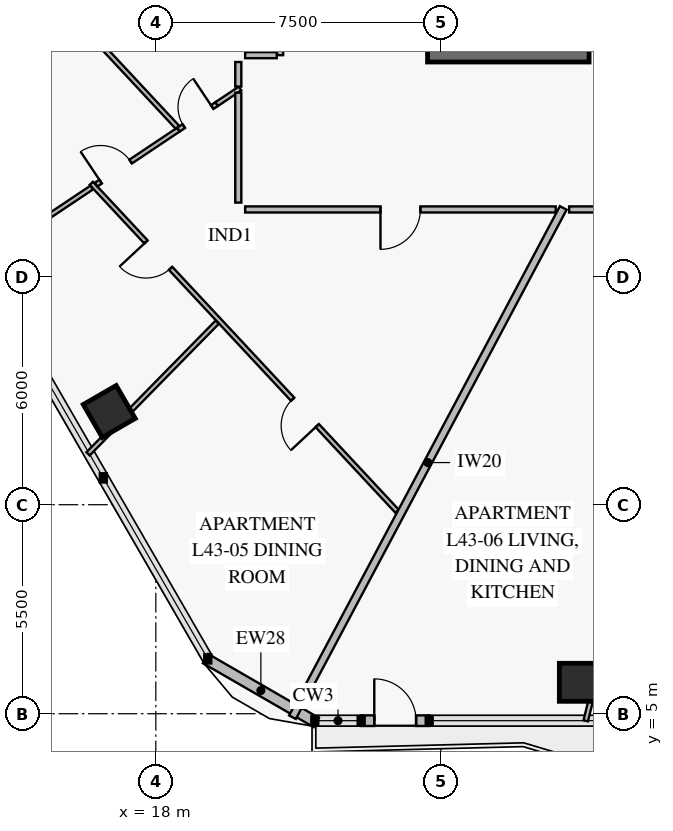
"""IFC4 building model, lengths in metres.
Left out: names, types, materials, properties, quantities, classifications, styles, units other than length and angle.
Written with IfcOpenShell. Run it as: python <this file> out.ifc"""

import sys

from ifc_helpers import new_model, si_unit, direction, frame, frame_2d, origin, origin_2d, place, context, subcontext, project, spatial, rectangle, extrude, element, fill, save


model = new_model("IFC4")
c1 = context("Model", 3, precision=1e-05, world=origin(), true_north=direction((0.0, 1.0)))
c2 = subcontext(c1, "Body", "Model", "MODEL_VIEW")
j1 = project(units=[si_unit("LENGTHUNIT", "METRE"), si_unit("PLANEANGLEUNIT", "RADIAN")], contexts=[c1])
p1 = place(None, origin())
s1 = spatial("IfcSite", under=j1, at=p1, CompositionType="ELEMENT")
p2 = place(p1, origin())
s2 = spatial("IfcBuilding", under=s1, at=p2, CompositionType="ELEMENT")
p3 = place(p2, frame((0.0, 0.0, 173.2)))
s3 = spatial("IfcBuildingStorey", under=s2, at=p3, CompositionType="ELEMENT", Elevation=173.2)
p4 = place(p3, frame((25.15, 22.5, 0.0), z_axis=(0.0, 0.0, 1.0), x_axis=(1.0, 0.0, 0.0)))
e1 = element("IfcWall", 1, at=p4, inside=s3, PredefinedType="SHEAR", context=c2, shape_type="SweptSolid", body=[
    extrude(rectangle(XDim=9.9, YDim=0.7, at=frame_2d((4.95, 0.0))), origin(), (0.0, 0.0, 1.0), 3.8),
])
p5 = place(p4, frame((4.25, 0.0, 0.0)))
e2 = element("IfcOpeningElement", 2, at=p5, cuts=e1, PredefinedType="OPENING", context=c2, shape_type="SweptSolid", body=[
    extrude(rectangle(XDim=1.5, YDim=2.15, at=frame_2d((0.75, 1.075))), frame((0.0, 0.362, 0.0), z_axis=(0.0, -1.0, 0.0), x_axis=(1.0, 0.0, 0.0)), (0.0, 0.0, 1.0), 0.724),
])
for number, where, z_axis, x_axis in (
    (3, (16.774, 12.953, 0.0), (0.0, 0.0, 1.0), (0.5, -0.866, 0.0)),
    (4, (29.118, 5.827, 0.0), (0.0, 0.0, 1.0), (1.0, 0.0, 0.0)),
):
    element("IfcColumn", number, at=place(p3, frame(where, z_axis=z_axis, x_axis=x_axis)), inside=s3, PredefinedType="COLUMN", context=c2, shape_type="SweptSolid", body=[
        extrude(rectangle(XDim=1.0, YDim=1.0, at=origin_2d()), origin(), (0.0, 0.0, 1.0), 3.55),
    ])
p6 = place(p3, frame((25.193, 4.817, 0.0), z_axis=(0.0, 0.0, 1.0), x_axis=(-1.0, 0.0, 0.0)))
e5 = element("IfcWall", 5, at=p6, inside=s3, PredefinedType="SOLIDWALL", context=c2, shape_type="SweptSolid", body=[
    extrude(rectangle(XDim=1.79, YDim=0.28, at=frame_2d((0.895, 0.0))), origin(), (0.0, 0.0, 1.0), 3.55),
])
p7 = place(p6, frame((0.345, 0.0, 0.0)))
e6 = element("IfcOpeningElement", 6, at=p7, cuts=e5, PredefinedType="OPENING", context=c2, shape_type="SweptSolid", body=[
    extrude(rectangle(XDim=1.1, YDim=2.2, at=frame_2d((0.55, 1.1))), frame((0.0, 0.152, 0.0), z_axis=(0.0, -1.0, 0.0), x_axis=(1.0, 0.0, 0.0)), (0.0, 0.0, 1.0), 0.304),
])
p8 = place(p3, frame((22.221, 4.769, 0.0), z_axis=(0.0, 0.0, 1.0), x_axis=(-0.866020068361, 0.500009241111, 0.0)))
e7 = element("IfcWall", 7, at=p8, inside=s3, PredefinedType="SOLIDWALL", context=c2, shape_type="SweptSolid", body=[
    extrude(rectangle(XDim=3.365, YDim=0.28, at=frame_2d((1.683, 0.0))), origin(), (0.0, 0.0, 1.0), 3.55),
])
p9 = place(p3, frame((16.302, 18.958, 0.0), z_axis=(0.0, 0.0, 1.0), x_axis=(0.681998933698, -0.731353166695, 0.0)))
e8 = element("IfcWall", 8, at=p9, inside=s3, PredefinedType="PARTITIONING", context=c2, shape_type="SweptSolid", body=[
    extrude(rectangle(XDim=11.798, YDim=0.12, at=frame_2d((5.899, 0.0))), origin(), (0.0, 0.0, 1.0), 2.9),
])
p10 = place(p9, frame((2.11, 0.0, 0.0)))
e9 = element("IfcOpeningElement", 9, at=p10, cuts=e8, PredefinedType="OPENING", context=c2, shape_type="SweptSolid", body=[
    extrude(rectangle(XDim=0.95, YDim=2.1, at=frame_2d((0.475, 1.05))), frame((0.0, 0.072, 0.0), z_axis=(0.0, -1.0, 0.0), x_axis=(1.0, 0.0, 0.0)), (0.0, 0.0, 1.0), 0.144),
])
p11 = place(p9, frame((7.769, 0.0, 0.0)))
e10 = element("IfcOpeningElement", 10, at=p11, cuts=e8, PredefinedType="OPENING", context=c2, shape_type="SweptSolid", body=[
    extrude(rectangle(XDim=0.95, YDim=2.1, at=frame_2d((0.475, 1.05))), frame((0.0, 0.072, 0.0), z_axis=(0.0, -1.0, 0.0), x_axis=(1.0, 0.0, 0.0)), (0.0, 0.0, 1.0), 0.144),
])
p12 = place(p3, frame((19.6, 21.042, 0.0), z_axis=(0.0, 0.0, 1.0), x_axis=(-0.831460345356, -0.555584101735, 0.0)))
e11 = element("IfcWall", 11, at=p12, inside=s3, PredefinedType="PARTITIONING", context=c2, shape_type="SweptSolid", body=[
    extrude(rectangle(XDim=1.211, YDim=0.12, at=frame_2d((0.605, 0.0))), origin(), (0.0, 0.0, 1.0), 3.15),
])
p13 = place(p12, frame((0.14, 0.0, 0.0)))
e12 = element("IfcOpeningElement", 12, at=p13, cuts=e11, PredefinedType="OPENING", context=c2, shape_type="SweptSolid", body=[
    extrude(rectangle(XDim=0.9, YDim=2.1, at=frame_2d((0.45, 1.05))), frame((0.0, 0.072, 0.0), z_axis=(0.0, -1.0, 0.0), x_axis=(1.0, 0.0, 0.0)), (0.0, 0.0, 1.0), 0.144),
])
p14 = place(p3, frame((18.594, 20.369, 0.0), z_axis=(0.0, 0.0, 1.0), x_axis=(-0.831487480853, -0.555543489913, 0.0)))
e13 = element("IfcWall", 13, at=p14, inside=s3, PredefinedType="PARTITIONING", context=c2, shape_type="SweptSolid", body=[
    extrude(rectangle(XDim=2.605, YDim=0.12, at=frame_2d((1.302, 0.0))), origin(), (0.0, 0.0, 1.0), 3.55),
])
p15 = place(p14, frame((1.51, 0.0, 0.0)))
e14 = element("IfcOpeningElement", 14, at=p15, cuts=e13, PredefinedType="OPENING", context=c2, shape_type="SweptSolid", body=[
    extrude(rectangle(XDim=0.95, YDim=2.1, at=frame_2d((0.475, 1.05))), frame((0.0, 0.072, 0.0), z_axis=(0.0, -1.0, 0.0), x_axis=(1.0, 0.0, 0.0)), (0.0, 0.0, 1.0), 0.144),
])
p16 = place(p3, frame((16.313, 18.846, 0.0), z_axis=(0.0, 0.0, 1.0), x_axis=(-0.831481603923, -0.555552285872, 0.0)))
e15 = element("IfcWall", 15, at=p16, inside=s3, PredefinedType="PARTITIONING", context=c2, shape_type="SweptSolid", body=[
    extrude(rectangle(XDim=3.569, YDim=0.12, at=frame_2d((1.785, 0.0))), origin(), (0.0, 0.0, 1.0), 2.87),
])
p17 = place(p3, frame((20.35, 18.27, 0.0), z_axis=(0.0, 0.0, 1.0), x_axis=(1.0, 0.0, 0.0)))
e16 = element("IfcWall", 16, at=p17, inside=s3, PredefinedType="PARTITIONING", context=c2, shape_type="SweptSolid", body=[
    extrude(rectangle(XDim=8.172, YDim=0.16, at=frame_2d((4.086, 0.0))), origin(), (0.0, 0.0, 1.0), 2.9),
])
p18 = place(p17, frame((3.561, 0.0, 0.0)))
e17 = element("IfcOpeningElement", 17, at=p18, cuts=e16, PredefinedType="OPENING", context=c2, shape_type="SweptSolid", body=[
    extrude(rectangle(XDim=1.05, YDim=2.15, at=frame_2d((0.525, 1.075))), frame((0.0, 0.092, 0.0), z_axis=(0.0, -1.0, 0.0), x_axis=(1.0, 0.0, 0.0)), (0.0, 0.0, 1.0), 0.184),
])
p19 = place(p3, frame((28.875, 18.27, 0.0), z_axis=(0.0, 0.0, 1.0), x_axis=(1.0, 0.0, 0.0)))
e18 = element("IfcWall", 18, at=p19, inside=s3, PredefinedType="PARTITIONING", context=c2, shape_type="SweptSolid", body=[
    extrude(rectangle(XDim=3.727, YDim=0.16, at=frame_2d((1.863, 0.0))), origin(), (0.0, 0.0, 1.0), 2.9),
])
p20 = place(p19, frame((1.338, 0.0, 0.0)))
e19 = element("IfcOpeningElement", 19, at=p20, cuts=e18, PredefinedType="OPENING", context=c2, shape_type="SweptSolid", body=[
    extrude(rectangle(XDim=1.05, YDim=2.15, at=frame_2d((0.525, 1.075))), frame((0.0, 0.092, 0.0), z_axis=(0.0, -1.0, 0.0), x_axis=(1.0, 0.0, 0.0)), (0.0, 0.0, 1.0), 0.184),
])
p21 = place(p3, frame((21.31, 25.46, 0.0), z_axis=(0.0, 0.0, 1.0), x_axis=(-0.913543837416, -0.406740282146, 0.0)))
e20 = element("IfcWall", 20, at=p21, inside=s3, PredefinedType="PARTITIONING", context=c2, shape_type="SweptSolid", body=[
    extrude(rectangle(XDim=11.253, YDim=0.2, at=frame_2d((5.626, 0.0))), origin(), (0.0, 0.0, 1.0), 2.87),
])
p22 = place(p3, frame((19.616, 15.304, 0.0), z_axis=(0.0, 0.0, 1.0), x_axis=(-0.700410055049, -0.713740677548, 0.0)))
e21 = element("IfcWall", 21, at=p22, inside=s3, PredefinedType="PARTITIONING", context=c2, shape_type="SweptSolid", body=[
    extrude(rectangle(XDim=3.315, YDim=0.12, at=frame_2d((1.657, 0.0))), origin(), (0.0, 0.0, 1.0), 3.55),
])
p23 = place(p3, frame((16.8, 12.433, 0.0), z_axis=(0.0, 0.0, 1.0), x_axis=(-0.700476016825, -0.713675941765, 0.0)))
e22 = element("IfcWall", 22, at=p23, inside=s3, PredefinedType="PARTITIONING", context=c2, shape_type="SweptSolid", body=[
    extrude(rectangle(XDim=0.832, YDim=0.12, at=frame_2d((0.416, 0.0))), origin(), (0.0, 0.0, 1.0), 3.122),
])
p24 = place(p3, frame((20.215, 21.453, 0.0), z_axis=(0.0, 0.0, 1.0), x_axis=(-0.831491262241, -0.555537830231, 0.0)))
e23 = element("IfcWall", 23, at=p24, inside=s3, PredefinedType="PARTITIONING", context=c2, shape_type="SweptSolid", body=[
    extrude(rectangle(XDim=0.74, YDim=0.12, at=frame_2d((0.37, 0.0))), origin(), (0.0, 0.0, 1.0), 3.55),
])
p25 = place(p3, frame((16.138, 23.039, 0.0), z_axis=(0.0, 0.0, 1.0), x_axis=(0.682000707563, -0.731351512532, 0.0)))
e24 = element("IfcWall", 24, at=p25, inside=s3, PredefinedType="PARTITIONING", context=c2, shape_type="SweptSolid", body=[
    extrude(rectangle(XDim=3.562, YDim=0.12, at=frame_2d((1.781, 0.0))), origin(), (0.0, 0.0, 1.0), 3.55),
])
p26 = place(p3, frame((28.721, 18.31, 0.0), z_axis=(0.0, 0.0, 1.0), x_axis=(-0.469463317487, -0.882951976913, 0.0)))
e25 = element("IfcWall", 25, at=p26, inside=s3, PredefinedType="PARTITIONING", context=c2, shape_type="SweptSolid", body=[
    extrude(rectangle(XDim=15.178, YDim=0.2, at=frame_2d((7.589, 0.0))), origin(), (0.0, 0.0, 1.0), 2.87),
])
p27 = place(p3, frame((29.434, 5.307, 0.0), z_axis=(0.0, 0.0, 1.0), x_axis=(-0.238810360324, -0.97106622421, 0.0)))
e26 = element("IfcWall", 26, at=p27, inside=s3, PredefinedType="PARTITIONING", context=c2, shape_type="SweptSolid", body=[
    extrude(rectangle(XDim=0.509, YDim=0.12, at=frame_2d((0.254, 0.0))), origin(), (0.0, 0.0, 1.0), 3.55),
])
p28 = place(p3, frame((20.17, 21.341, 0.0), z_axis=(0.0, 0.0, 1.0), x_axis=(0.0, -1.0, 0.0)))
e27 = element("IfcWall", 27, at=p28, inside=s3, PredefinedType="PARTITIONING", context=c2, shape_type="SweptSolid", body=[
    extrude(rectangle(XDim=2.891, YDim=0.16, at=frame_2d((1.446, 0.0))), origin(), (0.0, 0.0, 1.0), 3.15),
])
p29 = place(p3, frame((21.27, 25.265, 0.0), z_axis=(0.0, 0.0, 1.0), x_axis=(0.0, -1.0, 0.0)))
e28 = element("IfcWall", 28, at=p29, inside=s3, PredefinedType="PARTITIONING", context=c2, shape_type="SweptSolid", body=[
    extrude(rectangle(XDim=2.935, YDim=0.16, at=frame_2d((1.468, 0.0))), origin(), (0.0, 0.0, 1.0), 3.55),
])
p30 = place(p3, frame((21.182, 22.33, 0.0), z_axis=(0.0, 0.0, 1.0), x_axis=(-1.0, 0.0, 0.0)))
e29 = element("IfcWall", 29, at=p30, inside=s3, PredefinedType="PARTITIONING", context=c2, shape_type="SweptSolid", body=[
    extrude(rectangle(XDim=0.832, YDim=0.16, at=frame_2d((0.416, 0.0))), origin(), (0.0, 0.0, 1.0), 3.55),
])
p31 = place(p3, frame((20.17, 22.15, 0.0), z_axis=(0.0, 0.0, 1.0), x_axis=(0.0, -1.0, 0.0)))
e30 = element("IfcWall", 30, at=p31, inside=s3, PredefinedType="PARTITIONING", context=c2, shape_type="SweptSolid", body=[
    extrude(rectangle(XDim=0.646, YDim=0.16, at=frame_2d((0.323, 0.0))), origin(), (0.0, 0.0, 1.0), 3.55),
])
p32 = place(p7, frame((1.1, 0.0, 0.0), z_axis=(0.0, 0.0, 1.0), x_axis=(-1.0, 0.0, 0.0)))
e31 = element("IfcDoor", 31, at=p32, inside=s3, OperationType="SINGLE_SWING_LEFT", PredefinedType="DOOR", context=c2, shape_type="SweptSolid", body=[
    extrude(rectangle(XDim=1.1, YDim=2.2, at=frame_2d((0.55, 1.1))), frame((0.0, 0.025, 0.0), z_axis=(0.0, -1.0, 0.0), x_axis=(1.0, 0.0, 0.0)), (0.0, 0.0, 1.0), 0.05),
])
fill(e6, e31)
p33 = place(p10, frame((0.95, 0.0, 0.0), z_axis=(0.0, 0.0, 1.0), x_axis=(-1.0, 0.0, 0.0)))
e32 = element("IfcDoor", 32, at=p33, inside=s3, OperationType="SINGLE_SWING_RIGHT", PredefinedType="DOOR", context=c2, shape_type="SweptSolid", body=[
    extrude(rectangle(XDim=0.95, YDim=2.1, at=frame_2d((0.475, 1.05))), frame((0.0, 0.025, 0.0), z_axis=(0.0, -1.0, 0.0), x_axis=(1.0, 0.0, 0.0)), (0.0, 0.0, 1.0), 0.05),
])
fill(e9, e32)
p34 = place(p11, frame((0.95, 0.0, 0.0), z_axis=(0.0, 0.0, 1.0), x_axis=(-1.0, 0.0, 0.0)))
e33 = element("IfcDoor", 33, at=p34, inside=s3, OperationType="SINGLE_SWING_LEFT", PredefinedType="DOOR", context=c2, shape_type="SweptSolid", body=[
    extrude(rectangle(XDim=0.95, YDim=2.1, at=frame_2d((0.475, 1.05))), frame((0.0, 0.025, 0.0), z_axis=(0.0, -1.0, 0.0), x_axis=(1.0, 0.0, 0.0)), (0.0, 0.0, 1.0), 0.05),
])
fill(e10, e33)
p35 = place(p13, frame((0.9, 0.0, 0.0), z_axis=(0.0, 0.0, 1.0), x_axis=(-1.0, 0.0, 0.0)))
e34 = element("IfcDoor", 34, at=p35, inside=s3, OperationType="SINGLE_SWING_RIGHT", PredefinedType="DOOR", context=c2, shape_type="SweptSolid", body=[
    extrude(rectangle(XDim=0.9, YDim=2.1, at=frame_2d((0.45, 1.05))), frame((0.0, 0.025, 0.0), z_axis=(0.0, -1.0, 0.0), x_axis=(1.0, 0.0, 0.0)), (0.0, 0.0, 1.0), 0.05),
])
fill(e12, e34)
p36 = place(p15, frame((0.95, 0.0, 0.0), z_axis=(0.0, 0.0, 1.0), x_axis=(-1.0, 0.0, 0.0)))
e35 = element("IfcDoor", 35, at=p36, inside=s3, OperationType="SINGLE_SWING_LEFT", PredefinedType="DOOR", context=c2, shape_type="SweptSolid", body=[
    extrude(rectangle(XDim=0.95, YDim=2.1, at=frame_2d((0.475, 1.05))), frame((0.0, 0.025, 0.0), z_axis=(0.0, -1.0, 0.0), x_axis=(1.0, 0.0, 0.0)), (0.0, 0.0, 1.0), 0.05),
])
fill(e14, e35)
p37 = place(p18, frame((1.05, 0.0, 0.0), z_axis=(0.0, 0.0, 1.0), x_axis=(-1.0, 0.0, 0.0)))
e36 = element("IfcDoor", 36, at=p37, inside=s3, OperationType="SINGLE_SWING_RIGHT", PredefinedType="DOOR", context=c2, shape_type="SweptSolid", body=[
    extrude(rectangle(XDim=1.05, YDim=2.15, at=frame_2d((0.525, 1.075))), frame((0.0, 0.025, 0.0), z_axis=(0.0, -1.0, 0.0), x_axis=(1.0, 0.0, 0.0)), (0.0, 0.0, 1.0), 0.05),
])
fill(e17, e36)
save(model, sys.argv[1])
